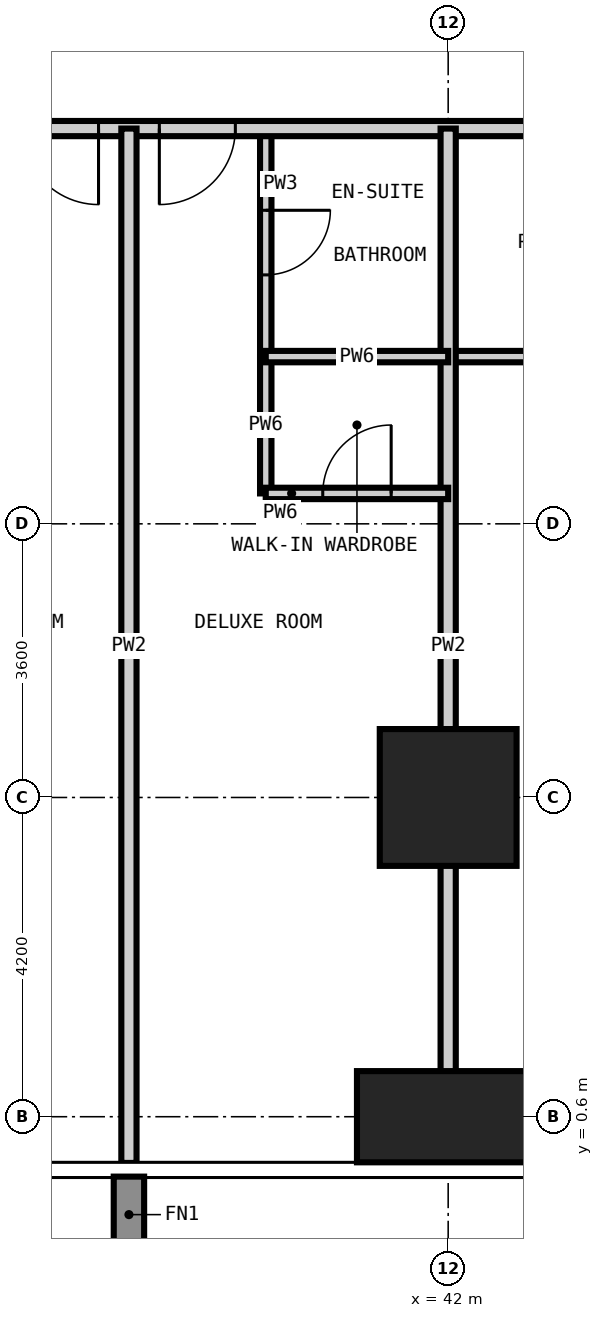
"""IFC4 building model, lengths in metres.
Left out: names, types, materials, properties, quantities, classifications, styles, units other than length and angle.
Written with IfcOpenShell. Run it as: python <this file> out.ifc"""

import sys

from ifc_helpers import new_model, si_unit, direction, frame, frame_2d, origin, origin_2d, place, context, subcontext, project, spatial, rectangle, extrude, element, fill, save


model = new_model("IFC4")
c1 = context("Model", 3, precision=1e-05, world=origin(), true_north=direction((0.0, 1.0)))
c2 = subcontext(c1, "Body", "Model", "MODEL_VIEW")
j1 = project(units=[si_unit("LENGTHUNIT", "METRE"), si_unit("PLANEANGLEUNIT", "RADIAN")], contexts=[c1])
p1 = place(None, origin())
s1 = spatial("IfcSite", under=j1, at=p1, CompositionType="ELEMENT")
p2 = place(p1, origin())
s2 = spatial("IfcBuilding", under=s1, at=p2, CompositionType="ELEMENT")
p3 = place(p2, frame((0.0, 0.0, 30.6)))
s3 = spatial("IfcBuildingStorey", under=s2, at=p3, CompositionType="ELEMENT", Elevation=30.6)
p4 = place(p3, frame((42.0, 0.6, -0.35), z_axis=(0.0, 0.0, 1.0), x_axis=(1.0, 0.0, 0.0)))
e1 = element("IfcColumn", 1, at=p4, inside=s3, PredefinedType="COLUMN", context=c2, shape_type="SweptSolid", body=[
    extrude(rectangle(XDim=2.4, YDim=1.2, at=origin_2d()), origin(), (0.0, 0.0, 1.0), 3.6),
])
p5 = place(p3, frame((42.0, 4.8, -0.35), z_axis=(0.0, 0.0, 1.0), x_axis=(1.0, 0.0, 0.0)))
e2 = element("IfcColumn", 2, at=p5, inside=s3, PredefinedType="COLUMN", context=c2, shape_type="SweptSolid", body=[
    extrude(rectangle(XDim=1.8, YDim=1.8, at=origin_2d()), origin(), (0.0, 0.0, 1.0), 3.6),
])
p6 = place(p3, frame((39.6, 10.6, 0.0), z_axis=(0.0, 0.0, 1.0), x_axis=(0.0, 1.0, 0.0)))
e3 = element("IfcWall", 3, at=p6, inside=s3, PredefinedType="PARTITIONING", context=c2, shape_type="SweptSolid", body=[
    extrude(rectangle(XDim=3.0, YDim=0.15, at=frame_2d((1.5, 0.0))), origin(), (0.0, 0.0, 1.0), 3.25),
])
p7 = place(p6, frame((1.075, 0.0, 0.0)))
e4 = element("IfcOpeningElement", 4, at=p7, cuts=e3, PredefinedType="OPENING", context=c2, shape_type="SweptSolid", body=[
    extrude(rectangle(XDim=0.85, YDim=2.1, at=frame_2d((0.425, 1.05))), frame((0.0, 0.085, 0.0), z_axis=(0.0, -1.0, 0.0), x_axis=(1.0, 0.0, 0.0)), (0.0, 0.0, 1.0), 0.17),
])
p8 = place(p3, frame((42.0, 10.6, 0.0), z_axis=(0.0, 0.0, 1.0), x_axis=(1.0, 0.0, 0.0)))
e5 = element("IfcWall", 5, at=p8, inside=s3, PredefinedType="PARTITIONING", context=c2, shape_type="SweptSolid", body=[
    extrude(rectangle(XDim=3.5, YDim=0.15, at=frame_2d((1.75, 0.0))), origin(), (0.0, 0.0, 1.0), 3.25),
])
p9 = place(p8, frame((1.325, 0.0, 0.0)))
e6 = element("IfcOpeningElement", 6, at=p9, cuts=e5, PredefinedType="OPENING", context=c2, shape_type="SweptSolid", body=[
    extrude(rectangle(XDim=0.85, YDim=2.1, at=frame_2d((0.425, 1.05))), frame((0.0, 0.085, 0.0), z_axis=(0.0, -1.0, 0.0), x_axis=(1.0, 0.0, 0.0)), (0.0, 0.0, 1.0), 0.17),
])
p10 = place(p3, frame((45.5, 13.6, 0.0), z_axis=(0.0, 0.0, 1.0), x_axis=(-1.0, 0.0, 0.0)))
e7 = element("IfcWall", 7, at=p10, inside=s3, PredefinedType="PARTITIONING", context=c2, shape_type="SweptSolid", body=[
    extrude(rectangle(XDim=31.9, YDim=0.2, at=frame_2d((15.95, 0.0))), origin(), (0.0, 0.0, 1.0), 3.25),
])
p11 = place(p10, frame((24.9, 0.0, 0.0)))
e8 = element("IfcOpeningElement", 8, at=p11, cuts=e7, PredefinedType="OPENING", context=c2, shape_type="SweptSolid", body=[
    extrude(rectangle(XDim=1.0, YDim=2.2, at=frame_2d((0.5, 1.1))), frame((0.0, 0.11, 0.0), z_axis=(0.0, -1.0, 0.0), x_axis=(1.0, 0.0, 0.0)), (0.0, 0.0, 1.0), 0.22),
])
p12 = place(p10, frame((23.1, 0.0, 0.0)))
e9 = element("IfcOpeningElement", 9, at=p12, cuts=e7, PredefinedType="OPENING", context=c2, shape_type="SweptSolid", body=[
    extrude(rectangle(XDim=1.0, YDim=2.2, at=frame_2d((0.5, 1.1))), frame((0.0, 0.11, 0.0), z_axis=(0.0, -1.0, 0.0), x_axis=(1.0, 0.0, 0.0)), (0.0, 0.0, 1.0), 0.22),
])
p13 = place(p10, frame((16.5, 0.0, 0.0)))
e10 = element("IfcOpeningElement", 10, at=p13, cuts=e7, PredefinedType="OPENING", context=c2, shape_type="SweptSolid", body=[
    extrude(rectangle(XDim=1.0, YDim=2.2, at=frame_2d((0.5, 1.1))), frame((0.0, 0.11, 0.0), z_axis=(0.0, -1.0, 0.0), x_axis=(1.0, 0.0, 0.0)), (0.0, 0.0, 1.0), 0.22),
])
p14 = place(p10, frame((14.7, 0.0, 0.0)))
e11 = element("IfcOpeningElement", 11, at=p14, cuts=e7, PredefinedType="OPENING", context=c2, shape_type="SweptSolid", body=[
    extrude(rectangle(XDim=1.0, YDim=2.2, at=frame_2d((0.5, 1.1))), frame((0.0, 0.11, 0.0), z_axis=(0.0, -1.0, 0.0), x_axis=(1.0, 0.0, 0.0)), (0.0, 0.0, 1.0), 0.22),
])
p15 = place(p10, frame((8.1, 0.0, 0.0)))
e12 = element("IfcOpeningElement", 12, at=p15, cuts=e7, PredefinedType="OPENING", context=c2, shape_type="SweptSolid", body=[
    extrude(rectangle(XDim=1.0, YDim=2.2, at=frame_2d((0.5, 1.1))), frame((0.0, 0.11, 0.0), z_axis=(0.0, -1.0, 0.0), x_axis=(1.0, 0.0, 0.0)), (0.0, 0.0, 1.0), 0.22),
])
p16 = place(p10, frame((6.3, 0.0, 0.0)))
e13 = element("IfcOpeningElement", 13, at=p16, cuts=e7, PredefinedType="OPENING", context=c2, shape_type="SweptSolid", body=[
    extrude(rectangle(XDim=1.0, YDim=2.2, at=frame_2d((0.5, 1.1))), frame((0.0, 0.11, 0.0), z_axis=(0.0, -1.0, 0.0), x_axis=(1.0, 0.0, 0.0)), (0.0, 0.0, 1.0), 0.22),
])
for number, where, z_axis, x_axis in (
    (14, (37.8, -0.008, 0.0), (0.0, 0.0, 1.0), (0.0, 1.0, 0.0)),
    (15, (42.0, -0.008, 0.0), (0.0, 0.0, 1.0), (0.0, 1.0, 0.0)),
):
    element("IfcWall", number, at=place(p3, frame(where, z_axis=z_axis, x_axis=x_axis)), inside=s3, PredefinedType="PARTITIONING", context=c2, shape_type="SweptSolid", body=[
        extrude(rectangle(XDim=13.608, YDim=0.2, at=frame_2d((6.804, 0.0))), origin(), (0.0, 0.0, 1.0), 3.25),
    ])
p17 = place(p3, frame((39.6, 8.8, 0.0), z_axis=(0.0, 0.0, 1.0), x_axis=(0.0, 1.0, 0.0)))
e16 = element("IfcWall", 16, at=p17, inside=s3, PredefinedType="PARTITIONING", context=c2, shape_type="SweptSolid", body=[
    extrude(rectangle(XDim=1.8, YDim=0.15, at=frame_2d((0.9, 0.0))), origin(), (0.0, 0.0, 1.0), 3.25),
])
p18 = place(p3, frame((39.6, 8.8, 0.0), z_axis=(0.0, 0.0, 1.0), x_axis=(1.0, 0.0, 0.0)))
e17 = element("IfcWall", 17, at=p18, inside=s3, PredefinedType="PARTITIONING", context=c2, shape_type="SweptSolid", body=[
    extrude(rectangle(XDim=2.4, YDim=0.15, at=frame_2d((1.2, 0.0))), origin(), (0.0, 0.0, 1.0), 3.25),
])
p19 = place(p18, frame((0.75, 0.0, 0.0)))
e18 = element("IfcOpeningElement", 18, at=p19, cuts=e17, PredefinedType="OPENING", context=c2, shape_type="SweptSolid", body=[
    extrude(rectangle(XDim=0.9, YDim=2.1, at=frame_2d((0.45, 1.05))), frame((0.0, 0.085, 0.0), z_axis=(0.0, -1.0, 0.0), x_axis=(1.0, 0.0, 0.0)), (0.0, 0.0, 1.0), 0.17),
])
p20 = place(p3, frame((39.6, 10.6, 0.0), z_axis=(0.0, 0.0, 1.0), x_axis=(1.0, 0.0, 0.0)))
e19 = element("IfcWall", 19, at=p20, inside=s3, PredefinedType="PARTITIONING", context=c2, shape_type="SweptSolid", body=[
    extrude(rectangle(XDim=2.4, YDim=0.15, at=frame_2d((1.2, 0.0))), origin(), (0.0, 0.0, 1.0), 3.25),
])
p21 = place(p15, origin())
e20 = element("IfcDoor", 20, at=p21, inside=s3, OperationType="SINGLE_SWING_LEFT", PredefinedType="DOOR", context=c2, shape_type="SweptSolid", body=[
    extrude(rectangle(XDim=1.0, YDim=2.2, at=frame_2d((0.5, 1.1))), frame((0.0, 0.025, 0.0), z_axis=(0.0, -1.0, 0.0), x_axis=(1.0, 0.0, 0.0)), (0.0, 0.0, 1.0), 0.05),
])
fill(e12, e20)
p22 = place(p16, origin())
e21 = element("IfcDoor", 21, at=p22, inside=s3, OperationType="SINGLE_SWING_RIGHT", PredefinedType="DOOR", context=c2, shape_type="SweptSolid", body=[
    extrude(rectangle(XDim=1.0, YDim=2.2, at=frame_2d((0.5, 1.1))), frame((0.0, 0.025, 0.0), z_axis=(0.0, -1.0, 0.0), x_axis=(1.0, 0.0, 0.0)), (0.0, 0.0, 1.0), 0.05),
])
fill(e13, e21)
p23 = place(p7, frame((0.85, 0.0, 0.0), z_axis=(0.0, 0.0, 1.0), x_axis=(-1.0, 0.0, 0.0)))
e22 = element("IfcDoor", 22, at=p23, inside=s3, OperationType="SINGLE_SWING_LEFT", PredefinedType="DOOR", context=c2, shape_type="SweptSolid", body=[
    extrude(rectangle(XDim=0.85, YDim=2.1, at=frame_2d((0.425, 1.05))), frame((0.0, 0.025, 0.0), z_axis=(0.0, -1.0, 0.0), x_axis=(1.0, 0.0, 0.0)), (0.0, 0.0, 1.0), 0.05),
])
fill(e4, e22)
p24 = place(p19, origin())
e23 = element("IfcDoor", 23, at=p24, inside=s3, OperationType="SINGLE_SWING_RIGHT", PredefinedType="DOOR", context=c2, shape_type="SweptSolid", body=[
    extrude(rectangle(XDim=0.9, YDim=2.1, at=frame_2d((0.45, 1.05))), frame((0.0, 0.025, 0.0), z_axis=(0.0, -1.0, 0.0), x_axis=(1.0, 0.0, 0.0)), (0.0, 0.0, 1.0), 0.05),
])
fill(e18, e23)
save(model, sys.argv[1])
